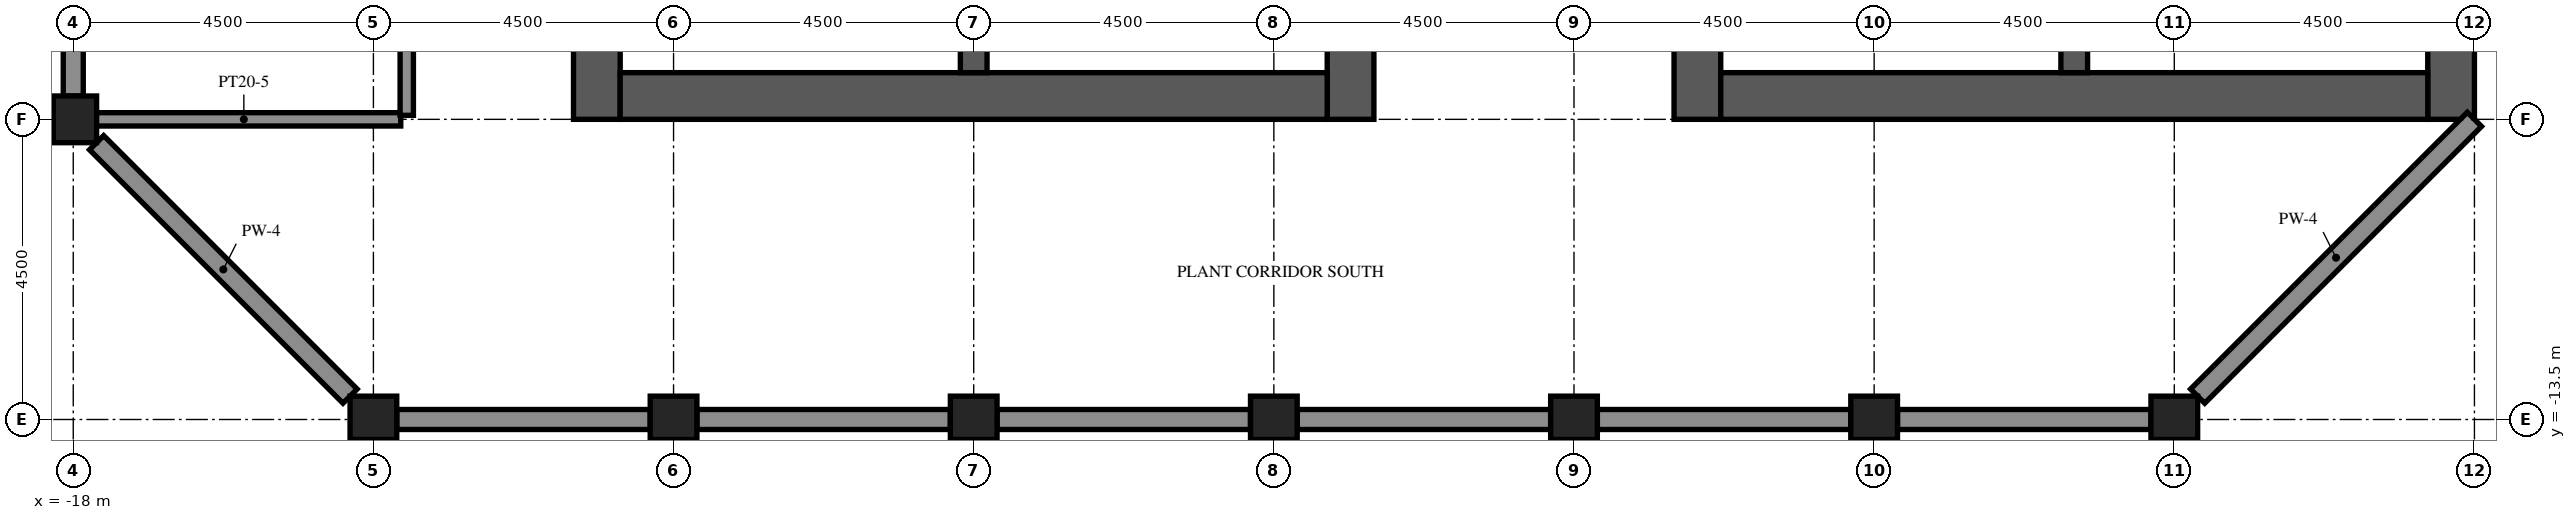
"""IFC4 building model, lengths in metres.
Left out: names, types, materials, properties, quantities, classifications, styles, units other than length and angle.
Written with IfcOpenShell. Run it as: python <this file> out.ifc"""

import sys

from ifc_helpers import new_model, si_unit, direction, frame, frame_2d, origin, origin_2d, place, context, subcontext, project, spatial, rectangle, extrude, element, save


model = new_model("IFC4")
c1 = context("Model", 3, precision=1e-05, world=origin(), true_north=direction((0.0, 1.0)))
c2 = subcontext(c1, "Body", "Model", "MODEL_VIEW")
j1 = project(units=[si_unit("LENGTHUNIT", "METRE"), si_unit("PLANEANGLEUNIT", "RADIAN")], contexts=[c1])
p1 = place(None, origin())
s1 = spatial("IfcSite", under=j1, at=p1, CompositionType="ELEMENT")
p2 = place(p1, origin())
s2 = spatial("IfcBuilding", under=s1, at=p2, CompositionType="ELEMENT")
p3 = place(p2, frame((0.0, 0.0, 306.4)))
s3 = spatial("IfcBuildingStorey", under=s2, at=p3, CompositionType="ELEMENT", Elevation=306.4)
for number, where, z_axis, x_axis in (
    (1, (-18.0, -9.0, 0.0), (0.0, 0.0, 1.0), (1.0, 0.0, 0.0)),
    (2, (-13.5, -13.5, 0.0), (0.0, 0.0, 1.0), (1.0, 0.0, 0.0)),
    (3, (-9.0, -13.5, 0.0), (0.0, 0.0, 1.0), (1.0, 0.0, 0.0)),
    (4, (-4.5, -13.5, 0.0), (0.0, 0.0, 1.0), (1.0, 0.0, 0.0)),
    (5, (0.0, -13.5, 0.0), (0.0, 0.0, 1.0), (1.0, 0.0, 0.0)),
    (6, (4.5, -13.5, 0.0), (0.0, 0.0, 1.0), (1.0, 0.0, 0.0)),
    (7, (9.0, -13.5, 0.0), (0.0, 0.0, 1.0), (1.0, 0.0, 0.0)),
    (8, (13.5, -13.5, 0.0), (0.0, 0.0, 1.0), (1.0, 0.0, 0.0)),
):
    element("IfcColumn", number, at=place(p3, frame(where, z_axis=z_axis, x_axis=x_axis)), inside=s3, PredefinedType="COLUMN", context=c2, shape_type="SweptSolid", body=[
        extrude(rectangle(XDim=0.7, YDim=0.7, at=origin_2d()), origin(), (0.0, 0.0, 1.0), 5.4),
    ])
p4 = place(p3, frame((-10.15, -9.0, 0.0), z_axis=(0.0, 0.0, 1.0), x_axis=(0.0, 1.0, 0.0)))
e9 = element("IfcWall", 9, at=p4, inside=s3, PredefinedType="SHEAR", context=c2, shape_type="SweptSolid", body=[
    extrude(rectangle(XDim=27.5, YDim=0.7, at=frame_2d((13.75, 0.0))), origin(), (0.0, 0.0, 1.0), 5.4),
])
p5 = place(p4, frame((12.55, 0.0, 0.0)))
e10 = element("IfcOpeningElement", 10, at=p5, cuts=e9, PredefinedType="OPENING", context=c2, shape_type="SweptSolid", body=[
    extrude(rectangle(XDim=2.4, YDim=2.4, at=frame_2d((1.2, 1.2))), frame((0.0, 0.36, 0.0), z_axis=(0.0, -1.0, 0.0), x_axis=(1.0, 0.0, 0.0)), (0.0, 0.0, 1.0), 0.72),
])
p6 = place(p4, frame((6.825, 0.0, 0.0)))
e11 = element("IfcOpeningElement", 11, at=p6, cuts=e9, PredefinedType="OPENING", context=c2, shape_type="SweptSolid", body=[
    extrude(rectangle(XDim=1.2, YDim=2.1, at=frame_2d((0.6, 1.05))), frame((0.0, 0.36, 0.0), z_axis=(0.0, -1.0, 0.0), x_axis=(1.0, 0.0, 0.0)), (0.0, 0.0, 1.0), 0.72),
])
p7 = place(p4, frame((19.475, 0.0, 0.0)))
e12 = element("IfcOpeningElement", 12, at=p7, cuts=e9, PredefinedType="OPENING", context=c2, shape_type="SweptSolid", body=[
    extrude(rectangle(XDim=1.2, YDim=2.1, at=frame_2d((0.6, 1.05))), frame((0.0, 0.36, 0.0), z_axis=(0.0, -1.0, 0.0), x_axis=(1.0, 0.0, 0.0)), (0.0, 0.0, 1.0), 0.72),
])
p8 = place(p3, frame((1.15, -9.0, 0.0), z_axis=(0.0, 0.0, 1.0), x_axis=(0.0, 1.0, 0.0)))
e13 = element("IfcWall", 13, at=p8, inside=s3, PredefinedType="SHEAR", context=c2, shape_type="SweptSolid", body=[
    extrude(rectangle(XDim=27.5, YDim=0.7, at=frame_2d((13.75, 0.0))), origin(), (0.0, 0.0, 1.0), 5.4),
])
p9 = place(p8, frame((12.55, 0.0, 0.0)))
e14 = element("IfcOpeningElement", 14, at=p9, cuts=e13, PredefinedType="OPENING", context=c2, shape_type="SweptSolid", body=[
    extrude(rectangle(XDim=2.4, YDim=2.4, at=frame_2d((1.2, 1.2))), frame((0.0, 0.36, 0.0), z_axis=(0.0, -1.0, 0.0), x_axis=(1.0, 0.0, 0.0)), (0.0, 0.0, 1.0), 0.72),
])
p10 = place(p8, frame((5.46, 0.0, 0.0)))
e15 = element("IfcOpeningElement", 15, at=p10, cuts=e13, PredefinedType="OPENING", context=c2, shape_type="SweptSolid", body=[
    extrude(rectangle(XDim=0.968, YDim=2.1, at=frame_2d((0.484, 1.05))), frame((0.0, 0.36, 0.0), z_axis=(0.0, -1.0, 0.0), x_axis=(1.0, 0.0, 0.0)), (0.0, 0.0, 1.0), 0.72),
])
p11 = place(p8, frame((23.54, 0.0, 0.0)))
e16 = element("IfcOpeningElement", 16, at=p11, cuts=e13, PredefinedType="OPENING", context=c2, shape_type="SweptSolid", body=[
    extrude(rectangle(XDim=1.2, YDim=2.1, at=frame_2d((0.6, 1.05))), frame((0.0, 0.36, 0.0), z_axis=(0.0, -1.0, 0.0), x_axis=(1.0, 0.0, 0.0)), (0.0, 0.0, 1.0), 0.72),
])
p12 = place(p3, frame((-9.8, -8.65, 0.0), z_axis=(0.0, 0.0, 1.0), x_axis=(1.0, 0.0, 0.0)))
e17 = element("IfcWall", 17, at=p12, inside=s3, PredefinedType="SHEAR", context=c2, shape_type="SweptSolid", body=[
    extrude(rectangle(XDim=10.6, YDim=0.7, at=frame_2d((5.3, 0.0))), origin(), (0.0, 0.0, 1.0), 5.4),
])
p13 = place(p3, frame((-4.5, -8.3, 0.0), z_axis=(0.0, 0.0, 1.0), x_axis=(0.0, 1.0, 0.0)))
e18 = element("IfcWall", 18, at=p13, inside=s3, PredefinedType="SHEAR", context=c2, shape_type="SweptSolid", body=[
    extrude(rectangle(XDim=7.6, YDim=0.4, at=frame_2d((3.8, 0.0))), origin(), (0.0, 0.0, 1.0), 5.4),
])
p14 = place(p3, frame((6.35, -9.0, 0.0), z_axis=(0.0, 0.0, 1.0), x_axis=(0.0, 1.0, 0.0)))
e19 = element("IfcWall", 19, at=p14, inside=s3, PredefinedType="SHEAR", context=c2, shape_type="SweptSolid", body=[
    extrude(rectangle(XDim=27.5, YDim=0.7, at=frame_2d((13.75, 0.0))), origin(), (0.0, 0.0, 1.0), 5.4),
])
p15 = place(p14, frame((12.55, 0.0, 0.0)))
e20 = element("IfcOpeningElement", 20, at=p15, cuts=e19, PredefinedType="OPENING", context=c2, shape_type="SweptSolid", body=[
    extrude(rectangle(XDim=2.4, YDim=2.4, at=frame_2d((1.2, 1.2))), frame((0.0, 0.36, 0.0), z_axis=(0.0, -1.0, 0.0), x_axis=(1.0, 0.0, 0.0)), (0.0, 0.0, 1.0), 0.72),
])
p16 = place(p14, frame((3.9, 0.0, 0.0)))
e21 = element("IfcOpeningElement", 21, at=p16, cuts=e19, PredefinedType="OPENING", context=c2, shape_type="SweptSolid", body=[
    extrude(rectangle(XDim=1.2, YDim=2.1, at=frame_2d((0.6, 1.05))), frame((0.0, 0.36, 0.0), z_axis=(0.0, -1.0, 0.0), x_axis=(1.0, 0.0, 0.0)), (0.0, 0.0, 1.0), 0.72),
])
p17 = place(p14, frame((22.4, 0.0, 0.0)))
e22 = element("IfcOpeningElement", 22, at=p17, cuts=e19, PredefinedType="OPENING", context=c2, shape_type="SweptSolid", body=[
    extrude(rectangle(XDim=1.2, YDim=2.1, at=frame_2d((0.6, 1.05))), frame((0.0, 0.36, 0.0), z_axis=(0.0, -1.0, 0.0), x_axis=(1.0, 0.0, 0.0)), (0.0, 0.0, 1.0), 0.72),
])
p18 = place(p3, frame((17.65, -9.0, 0.0), z_axis=(0.0, 0.0, 1.0), x_axis=(0.0, 1.0, 0.0)))
e23 = element("IfcWall", 23, at=p18, inside=s3, PredefinedType="SHEAR", context=c2, shape_type="SweptSolid", body=[
    extrude(rectangle(XDim=27.5, YDim=0.7, at=frame_2d((13.75, 0.0))), origin(), (0.0, 0.0, 1.0), 5.4),
])
p19 = place(p3, frame((6.7, -8.65, 0.0), z_axis=(0.0, 0.0, 1.0), x_axis=(1.0, 0.0, 0.0)))
e24 = element("IfcWall", 24, at=p19, inside=s3, PredefinedType="SHEAR", context=c2, shape_type="SweptSolid", body=[
    extrude(rectangle(XDim=10.6, YDim=0.7, at=frame_2d((5.3, 0.0))), origin(), (0.0, 0.0, 1.0), 5.4),
])
p20 = place(p3, frame((12.0, -8.3, 0.0), z_axis=(0.0, 0.0, 1.0), x_axis=(0.0, 1.0, 0.0)))
e25 = element("IfcWall", 25, at=p20, inside=s3, PredefinedType="SHEAR", context=c2, shape_type="SweptSolid", body=[
    extrude(rectangle(XDim=7.6, YDim=0.4, at=frame_2d((3.8, 0.0))), origin(), (0.0, 0.0, 1.0), 5.4),
])
p21 = place(p20, frame((6.125, 0.0, 0.0)))
e26 = element("IfcOpeningElement", 26, at=p21, cuts=e25, PredefinedType="OPENING", context=c2, shape_type="SweptSolid", body=[
    extrude(rectangle(XDim=1.2, YDim=2.1, at=frame_2d((0.6, 1.05))), frame((0.0, 0.21, 0.0), z_axis=(0.0, -1.0, 0.0), x_axis=(1.0, 0.0, 0.0)), (0.0, 0.0, 1.0), 0.42),
])
for number, where, z_axis, x_axis in (
    (27, (-13.15, -13.5, 0.0), (0.0, 0.0, 1.0), (1.0, 0.0, 0.0)),
    (28, (-8.65, -13.5, 0.0), (0.0, 0.0, 1.0), (1.0, 0.0, 0.0)),
    (29, (-4.15, -13.5, 0.0), (0.0, 0.0, 1.0), (1.0, 0.0, 0.0)),
    (30, (0.35, -13.5, 0.0), (0.0, 0.0, 1.0), (1.0, 0.0, 0.0)),
    (31, (4.85, -13.5, 0.0), (0.0, 0.0, 1.0), (1.0, 0.0, 0.0)),
    (32, (9.35, -13.5, 0.0), (0.0, 0.0, 1.0), (1.0, 0.0, 0.0)),
):
    element("IfcWall", number, at=place(p3, frame(where, z_axis=z_axis, x_axis=x_axis)), inside=s3, PredefinedType="SOLIDWALL", context=c2, shape_type="SweptSolid", body=[
        extrude(rectangle(XDim=3.8, YDim=0.3, at=frame_2d((1.9, 0.0))), origin(), (0.0, 0.0, 1.0), 0.85),
    ])
p22 = place(p3, frame((13.85, -13.15, 0.0), z_axis=(0.0, 0.0, 1.0), x_axis=(0.707106781187, 0.707106781187, 0.0)))
e33 = element("IfcWall", 33, at=p22, inside=s3, PredefinedType="SOLIDWALL", context=c2, shape_type="SweptSolid", body=[
    extrude(rectangle(XDim=5.869, YDim=0.3, at=frame_2d((2.935, 0.0))), origin(), (0.0, 0.0, 1.0), 4.1),
])
p23 = place(p3, frame((-18.0, -4.85, 0.0), z_axis=(0.0, 0.0, 1.0), x_axis=(0.0, -1.0, 0.0)))
e34 = element("IfcWall", 34, at=p23, inside=s3, PredefinedType="SOLIDWALL", context=c2, shape_type="SweptSolid", body=[
    extrude(rectangle(XDim=3.8, YDim=0.3, at=frame_2d((1.9, 0.0))), origin(), (0.0, 0.0, 1.0), 0.85),
])
p24 = place(p3, frame((-17.65, -9.35, 0.0), z_axis=(0.0, 0.0, 1.0), x_axis=(0.707106781187, -0.707106781187, 0.0)))
e35 = element("IfcWall", 35, at=p24, inside=s3, PredefinedType="SOLIDWALL", context=c2, shape_type="SweptSolid", body=[
    extrude(rectangle(XDim=5.374, YDim=0.3, at=frame_2d((2.687, 0.0))), origin(), (0.0, 0.0, 1.0), 4.1),
])
p25 = place(p3, frame((-17.795, -9.0, 0.0), z_axis=(0.0, 0.0, 1.0), x_axis=(1.0, 0.0, 0.0)))
e36 = element("IfcWall", 36, at=p25, inside=s3, PredefinedType="PARTITIONING", context=c2, shape_type="SweptSolid", body=[
    extrude(rectangle(XDim=4.705, YDim=0.2, at=frame_2d((2.353, 0.0))), origin(), (0.0, 0.0, 1.0), 4.8),
])
p26 = place(p3, frame((-13.0, -8.94, 0.0), z_axis=(0.0, 0.0, 1.0), x_axis=(0.0, 1.0, 0.0)))
e37 = element("IfcWall", 37, at=p26, inside=s3, PredefinedType="PARTITIONING", context=c2, shape_type="SweptSolid", body=[
    extrude(rectangle(XDim=11.94, YDim=0.2, at=frame_2d((5.97, 0.0))), origin(), (0.0, 0.0, 1.0), 3.6),
])
p27 = place(p26, frame((5.54, 0.0, 0.0)))
e38 = element("IfcOpeningElement", 38, at=p27, cuts=e37, PredefinedType="OPENING", context=c2, shape_type="SweptSolid", body=[
    extrude(rectangle(XDim=1.0, YDim=2.1, at=frame_2d((0.5, 1.05))), frame((0.0, 0.11, 0.0), z_axis=(0.0, -1.0, 0.0), x_axis=(1.0, 0.0, 0.0)), (0.0, 0.0, 1.0), 0.22),
])
p28 = place(p3, frame((-1.75, -8.3, 0.0), z_axis=(0.0, 0.0, 1.0), x_axis=(0.0, 1.0, 0.0)))
e39 = element("IfcWall", 39, at=p28, inside=s3, PredefinedType="PARTITIONING", context=c2, shape_type="SweptSolid", body=[
    extrude(rectangle(XDim=4.56, YDim=0.1, at=frame_2d((2.28, 0.0))), origin(), (0.0, 0.0, 1.0), 4.8),
])
save(model, sys.argv[1])
